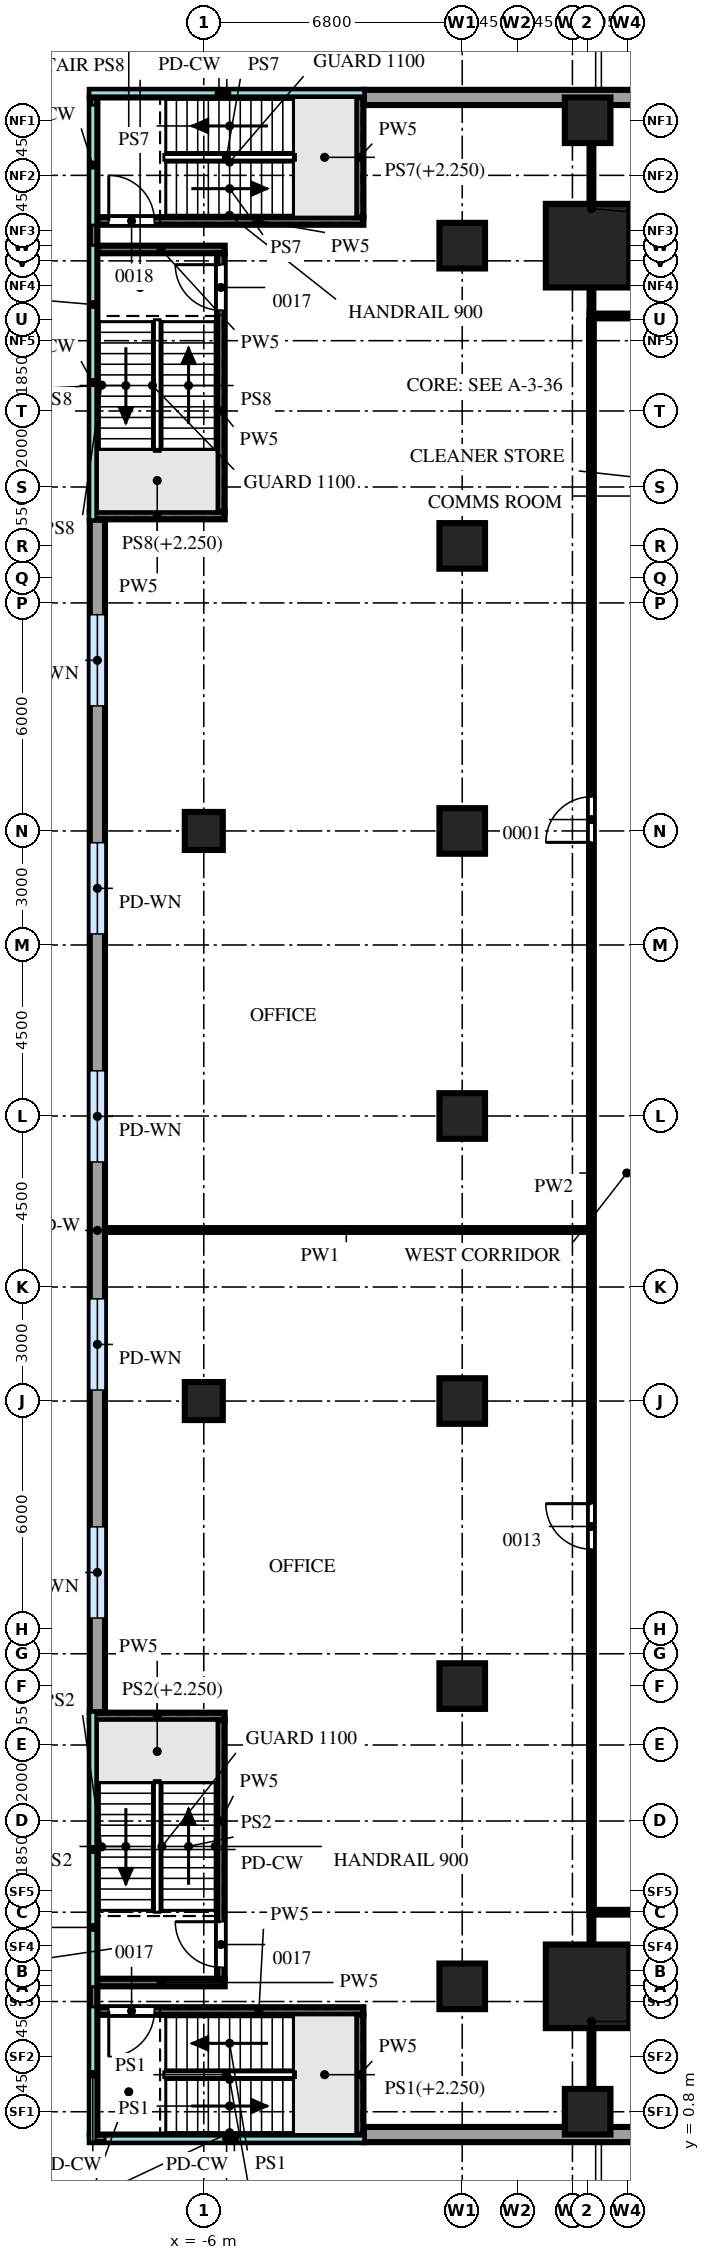
"""IFC4 building model, lengths in metres.
Left out: names, types, materials, properties, quantities, classifications, styles, units other than length and angle.
Written with IfcOpenShell. Run it as: python <this file> out.ifc"""

import sys

from ifc_helpers import new_model, si_unit, direction, frame, frame_2d, origin, origin_2d, place, context, subcontext, project, spatial, rectangle, extrude, source, transform, mapped, element, fill, save


model = new_model("IFC4")
c1 = context("Model", 3, precision=1e-05, world=origin(), true_north=direction((0.0, 1.0)))
c2 = subcontext(c1, "Body", "Model", "MODEL_VIEW")
j1 = project(units=[si_unit("LENGTHUNIT", "METRE"), si_unit("PLANEANGLEUNIT", "RADIAN")], contexts=[c1])
p1 = place(None, origin())
s1 = spatial("IfcSite", under=j1, at=p1, CompositionType="ELEMENT")
p2 = place(p1, origin())
s2 = spatial("IfcBuilding", under=s1, at=p2, CompositionType="ELEMENT")
p3 = place(p2, frame((0.0, 0.0, 28.5)))
s3 = spatial("IfcBuildingStorey", under=s2, at=p3, CompositionType="ELEMENT", Elevation=28.5)
m1 = source(origin(), c2, "Body", "SweptSolid", [
    extrude(rectangle(XDim=2.2, YDim=2.2, at=origin_2d()), origin(), (0.0, 0.0, 1.0), 4.5),
])
for number, where, z_axis, x_axis in (
    (1, (4.1, 49.9, 0.0), (0.0, 0.0, 1.0), (1.0, 0.0, 0.0)),
    (2, (4.1, 4.1, 0.0), (0.0, 0.0, 1.0), (1.0, 0.0, 0.0)),
):
    element("IfcColumn", number, at=place(p3, frame(where, z_axis=z_axis, x_axis=x_axis)), inside=s3, PredefinedType="COLUMN", context=c2, shape_type="MappedRepresentation", body=[
        mapped(m1, transform((0.0, 0.0, 0.0))),
    ])
m2 = source(origin(), c2, "Body", "SweptSolid", [
    extrude(rectangle(XDim=1.2, YDim=1.2, at=origin_2d()), origin(), (0.0, 0.0, 1.0), 4.0),
])
for number, where, z_axis, x_axis in (
    (3, (4.1, 0.8, 0.0), (0.0, 0.0, 1.0), (1.0, 0.0, 0.0)),
    (4, (4.1, 53.2, 0.0), (0.0, 0.0, 1.0), (1.0, 0.0, 0.0)),
    (5, (0.8, 4.1, 0.0), (0.0, 0.0, 1.0), (1.0, 0.0, 0.0)),
    (6, (0.8, 12.0, 0.0), (0.0, 0.0, 1.0), (1.0, 0.0, 0.0)),
    (7, (0.8, 19.5, 0.0), (0.0, 0.0, 1.0), (1.0, 0.0, 0.0)),
    (8, (0.8, 27.0, 0.0), (0.0, 0.0, 1.0), (1.0, 0.0, 0.0)),
    (9, (0.8, 34.5, 0.0), (0.0, 0.0, 1.0), (1.0, 0.0, 0.0)),
    (10, (0.8, 42.0, 0.0), (0.0, 0.0, 1.0), (1.0, 0.0, 0.0)),
    (11, (0.8, 49.9, 0.0), (0.0, 0.0, 1.0), (1.0, 0.0, 0.0)),
):
    element("IfcColumn", number, at=place(p3, frame(where, z_axis=z_axis, x_axis=x_axis)), inside=s3, PredefinedType="COLUMN", context=c2, shape_type="MappedRepresentation", body=[
        mapped(m2, transform((0.0, 0.0, 0.0))),
    ])
m3 = source(origin(), c2, "Body", "SweptSolid", [
    extrude(rectangle(XDim=1.0, YDim=1.0, at=origin_2d()), origin(), (0.0, 0.0, 1.0), 4.5),
])
for number, where, z_axis, x_axis in (
    (12, (-6.0, 19.5, 0.0), (0.0, 0.0, 1.0), (1.0, 0.0, 0.0)),
    (13, (-6.0, 34.5, 0.0), (0.0, 0.0, 1.0), (1.0, 0.0, 0.0)),
):
    element("IfcColumn", number, at=place(p3, frame(where, z_axis=z_axis, x_axis=x_axis)), inside=s3, PredefinedType="COLUMN", context=c2, shape_type="MappedRepresentation", body=[
        mapped(m3, transform((0.0, 0.0, 0.0))),
    ])
m4 = source(origin(), c2, "Body", "SweptSolid", [
    extrude(rectangle(XDim=31.38, YDim=0.4, at=frame_2d((15.69, 0.0))), origin(), (0.0, 0.0, 1.0), 4.2),
])
p4 = place(p3, frame((-8.8, 42.69, 0.0), z_axis=(0.0, 0.0, 1.0), x_axis=(0.0, -1.0, 0.0)))
e14 = element("IfcWall", 14, at=p4, inside=s3, PredefinedType="SOLIDWALL", context=c2, shape_type="MappedRepresentation", body=[
    mapped(m4, transform((0.0, 0.0, 0.0))),
])
m5 = source(origin(), c2, "Body", "SweptSolid", [
    extrude(rectangle(XDim=2.4, YDim=2.4, at=frame_2d((1.2, 1.2))), frame((0.0, 0.21, 0.0), z_axis=(0.0, -1.0, 0.0), x_axis=(1.0, 0.0, 0.0)), (0.0, 0.0, 1.0), 0.42),
])
p5 = place(p4, frame((2.5, 0.0, 1.0)))
e15 = element("IfcOpeningElement", 15, at=p5, cuts=e14, PredefinedType="OPENING", context=c2, shape_type="MappedRepresentation", body=[
    mapped(m5, transform((0.0, 0.0, 0.0))),
])
p6 = place(p4, frame((8.5, 0.0, 1.0)))
e16 = element("IfcOpeningElement", 16, at=p6, cuts=e14, PredefinedType="OPENING", context=c2, shape_type="MappedRepresentation", body=[
    mapped(m5, transform((0.0, 0.0, 0.0))),
])
p7 = place(p4, frame((14.5, 0.0, 1.0)))
e17 = element("IfcOpeningElement", 17, at=p7, cuts=e14, PredefinedType="OPENING", context=c2, shape_type="MappedRepresentation", body=[
    mapped(m5, transform((0.0, 0.0, 0.0))),
])
p8 = place(p4, frame((20.5, 0.0, 1.0)))
e18 = element("IfcOpeningElement", 18, at=p8, cuts=e14, PredefinedType="OPENING", context=c2, shape_type="MappedRepresentation", body=[
    mapped(m5, transform((0.0, 0.0, 0.0))),
])
p9 = place(p4, frame((26.5, 0.0, 1.0)))
e19 = element("IfcOpeningElement", 19, at=p9, cuts=e14, PredefinedType="OPENING", context=c2, shape_type="MappedRepresentation", body=[
    mapped(m5, transform((0.0, 0.0, 0.0))),
])
m6 = source(origin(), c2, "Body", "SweptSolid", [
    extrude(rectangle(XDim=33.64, YDim=0.4, at=frame_2d((16.82, 0.0))), origin(), (0.0, 0.0, 1.0), 4.2),
])
p10 = place(p3, frame((-1.79, 0.2, 0.0), z_axis=(0.0, 0.0, 1.0), x_axis=(1.0, 0.0, 0.0)))
e20 = element("IfcWall", 20, at=p10, inside=s3, PredefinedType="SOLIDWALL", context=c2, shape_type="MappedRepresentation", body=[
    mapped(m6, transform((0.0, 0.0, 0.0))),
])
p11 = place(p10, frame((9.6, 0.0, 1.0)))
e21 = element("IfcOpeningElement", 21, at=p11, cuts=e20, PredefinedType="OPENING", context=c2, shape_type="MappedRepresentation", body=[
    mapped(m5, transform((0.0, 0.0, 0.0))),
])
p12 = place(p10, frame((15.6, 0.0, 1.0)))
e22 = element("IfcOpeningElement", 22, at=p12, cuts=e20, PredefinedType="OPENING", context=c2, shape_type="MappedRepresentation", body=[
    mapped(m5, transform((0.0, 0.0, 0.0))),
])
m7 = source(origin(), c2, "Body", "SweptSolid", [
    extrude(rectangle(XDim=33.24, YDim=0.4, at=frame_2d((16.62, 0.0))), origin(), (0.0, 0.0, 1.0), 4.2),
])
p13 = place(p3, frame((31.45, 53.8, 0.0), z_axis=(0.0, 0.0, 1.0), x_axis=(-1.0, 0.0, 0.0)))
e23 = element("IfcWall", 23, at=p13, inside=s3, PredefinedType="SOLIDWALL", context=c2, shape_type="MappedRepresentation", body=[
    mapped(m7, transform((0.0, 0.0, 0.0))),
])
p14 = place(p13, frame((15.4, 0.0, 1.0)))
e24 = element("IfcOpeningElement", 24, at=p14, cuts=e23, PredefinedType="OPENING", context=c2, shape_type="MappedRepresentation", body=[
    mapped(m5, transform((0.0, 0.0, 0.0))),
])
p15 = place(p13, frame((21.4, 0.0, 1.0)))
e25 = element("IfcOpeningElement", 25, at=p15, cuts=e23, PredefinedType="OPENING", context=c2, shape_type="MappedRepresentation", body=[
    mapped(m5, transform((0.0, 0.0, 0.0))),
])
m8 = source(origin(), c2, "Body", "SweptSolid", [
    extrude(rectangle(XDim=7.2, YDim=0.2, at=frame_2d((3.6, 0.0))), origin(), (0.0, 0.0, 1.0), 4.0),
])
p16 = place(p3, frame((-9.0, 0.1, 0.0), z_axis=(0.0, 0.0, 1.0), x_axis=(1.0, 0.0, 0.0)))
e26 = element("IfcWall", 26, at=p16, inside=s3, PredefinedType="PARTITIONING", context=c2, shape_type="MappedRepresentation", body=[
    mapped(m8, transform((0.0, 0.0, 0.0))),
])
m9 = source(origin(), c2, "Body", "SweptSolid", [
    extrude(rectangle(XDim=7.0, YDim=0.2, at=frame_2d((3.5, 0.0))), origin(), (0.0, 0.0, 1.0), 4.0),
])
p17 = place(p3, frame((-8.8, 3.45, 0.0), z_axis=(0.0, 0.0, 1.0), x_axis=(1.0, 0.0, 0.0)))
e27 = element("IfcWall", 27, at=p17, inside=s3, PredefinedType="PARTITIONING", context=c2, shape_type="MappedRepresentation", body=[
    mapped(m9, transform((0.0, 0.0, 0.0))),
])
m10 = source(origin(), c2, "Body", "SweptSolid", [
    extrude(rectangle(XDim=1.2, YDim=2.1, at=frame_2d((0.6, 1.05))), frame((0.0, 0.11, 0.0), z_axis=(0.0, -1.0, 0.0), x_axis=(1.0, 0.0, 0.0)), (0.0, 0.0, 1.0), 0.22),
])
p18 = place(p17, frame((0.3, 0.0, 0.0)))
e28 = element("IfcOpeningElement", 28, at=p18, cuts=e27, PredefinedType="OPENING", context=c2, shape_type="MappedRepresentation", body=[
    mapped(m10, transform((0.0, 0.0, 0.0))),
])
m11 = source(origin(), c2, "Body", "SweptSolid", [
    extrude(rectangle(XDim=10.9, YDim=0.2, at=frame_2d((5.45, 0.0))), origin(), (0.0, 0.0, 1.0), 4.0),
])
p19 = place(p3, frame((-8.9, 0.2, 0.0), z_axis=(0.0, 0.0, 1.0), x_axis=(0.0, 1.0, 0.0)))
e29 = element("IfcWall", 29, at=p19, inside=s3, PredefinedType="PARTITIONING", context=c2, shape_type="MappedRepresentation", body=[
    mapped(m11, transform((0.0, 0.0, 0.0))),
])
m12 = source(origin(), c2, "Body", "SweptSolid", [
    extrude(rectangle(XDim=3.15, YDim=0.2, at=frame_2d((1.575, 0.0))), origin(), (0.0, 0.0, 1.0), 4.0),
])
p20 = place(p3, frame((-1.9, 0.2, 0.0), z_axis=(0.0, 0.0, 1.0), x_axis=(0.0, 1.0, 0.0)))
e30 = element("IfcWall", 30, at=p20, inside=s3, PredefinedType="PARTITIONING", context=c2, shape_type="MappedRepresentation", body=[
    mapped(m12, transform((0.0, 0.0, 0.0))),
])
m13 = source(origin(), c2, "Body", "SweptSolid", [
    extrude(rectangle(XDim=3.35, YDim=0.2, at=frame_2d((1.675, 0.0))), origin(), (0.0, 0.0, 1.0), 4.0),
])
p21 = place(p3, frame((-8.8, 4.2, 0.0), z_axis=(0.0, 0.0, 1.0), x_axis=(1.0, 0.0, 0.0)))
e31 = element("IfcWall", 31, at=p21, inside=s3, PredefinedType="PARTITIONING", context=c2, shape_type="MappedRepresentation", body=[
    mapped(m13, transform((0.0, 0.0, 0.0))),
])
m14 = source(origin(), c2, "Body", "SweptSolid", [
    extrude(rectangle(XDim=3.55, YDim=0.2, at=frame_2d((1.775, 0.0))), origin(), (0.0, 0.0, 1.0), 4.0),
])
p22 = place(p3, frame((-9.0, 11.2, 0.0), z_axis=(0.0, 0.0, 1.0), x_axis=(1.0, 0.0, 0.0)))
e32 = element("IfcWall", 32, at=p22, inside=s3, PredefinedType="PARTITIONING", context=c2, shape_type="MappedRepresentation", body=[
    mapped(m14, transform((0.0, 0.0, 0.0))),
])
m15 = source(origin(), c2, "Body", "SweptSolid", [
    extrude(rectangle(XDim=6.8, YDim=0.2, at=frame_2d((3.4, 0.0))), origin(), (0.0, 0.0, 1.0), 4.0),
])
p23 = place(p3, frame((-5.55, 4.3, 0.0), z_axis=(0.0, 0.0, 1.0), x_axis=(0.0, 1.0, 0.0)))
e33 = element("IfcWall", 33, at=p23, inside=s3, PredefinedType="PARTITIONING", context=c2, shape_type="MappedRepresentation", body=[
    mapped(m15, transform((0.0, 0.0, 0.0))),
])
p24 = place(p23, frame((0.3, 0.0, 0.0)))
e34 = element("IfcOpeningElement", 34, at=p24, cuts=e33, PredefinedType="OPENING", context=c2, shape_type="MappedRepresentation", body=[
    mapped(m10, transform((0.0, 0.0, 0.0))),
])
p25 = place(p3, frame((-8.8, 50.55, 0.0), z_axis=(0.0, 0.0, 1.0), x_axis=(1.0, 0.0, 0.0)))
e35 = element("IfcWall", 35, at=p25, inside=s3, PredefinedType="PARTITIONING", context=c2, shape_type="MappedRepresentation", body=[
    mapped(m9, transform((0.0, 0.0, 0.0))),
])
p26 = place(p25, frame((0.3, 0.0, 0.0)))
e36 = element("IfcOpeningElement", 36, at=p26, cuts=e35, PredefinedType="OPENING", context=c2, shape_type="MappedRepresentation", body=[
    mapped(m10, transform((0.0, 0.0, 0.0))),
])
p27 = place(p3, frame((-9.0, 53.9, 0.0), z_axis=(0.0, 0.0, 1.0), x_axis=(1.0, 0.0, 0.0)))
e37 = element("IfcWall", 37, at=p27, inside=s3, PredefinedType="PARTITIONING", context=c2, shape_type="MappedRepresentation", body=[
    mapped(m8, transform((0.0, 0.0, 0.0))),
])
p28 = place(p3, frame((-1.9, 50.65, 0.0), z_axis=(0.0, 0.0, 1.0), x_axis=(0.0, 1.0, 0.0)))
e38 = element("IfcWall", 38, at=p28, inside=s3, PredefinedType="PARTITIONING", context=c2, shape_type="MappedRepresentation", body=[
    mapped(m12, transform((0.0, 0.0, 0.0))),
])
p29 = place(p3, frame((-9.0, 42.8, 0.0), z_axis=(0.0, 0.0, 1.0), x_axis=(1.0, 0.0, 0.0)))
e39 = element("IfcWall", 39, at=p29, inside=s3, PredefinedType="PARTITIONING", context=c2, shape_type="MappedRepresentation", body=[
    mapped(m14, transform((0.0, 0.0, 0.0))),
])
p30 = place(p3, frame((-8.8, 49.8, 0.0), z_axis=(0.0, 0.0, 1.0), x_axis=(1.0, 0.0, 0.0)))
e40 = element("IfcWall", 40, at=p30, inside=s3, PredefinedType="PARTITIONING", context=c2, shape_type="MappedRepresentation", body=[
    mapped(m13, transform((0.0, 0.0, 0.0))),
])
p31 = place(p3, frame((-8.9, 42.9, 0.0), z_axis=(0.0, 0.0, 1.0), x_axis=(0.0, 1.0, 0.0)))
e41 = element("IfcWall", 41, at=p31, inside=s3, PredefinedType="PARTITIONING", context=c2, shape_type="MappedRepresentation", body=[
    mapped(m11, transform((0.0, 0.0, 0.0))),
])
p32 = place(p3, frame((-5.55, 42.9, 0.0), z_axis=(0.0, 0.0, 1.0), x_axis=(0.0, 1.0, 0.0)))
e42 = element("IfcWall", 42, at=p32, inside=s3, PredefinedType="PARTITIONING", context=c2, shape_type="MappedRepresentation", body=[
    mapped(m15, transform((0.0, 0.0, 0.0))),
])
p33 = place(p32, frame((5.3, 0.0, 0.0)))
e43 = element("IfcOpeningElement", 43, at=p33, cuts=e42, PredefinedType="OPENING", context=c2, shape_type="MappedRepresentation", body=[
    mapped(m10, transform((0.0, 0.0, 0.0))),
])
m16 = source(origin(), c2, "Body", "SweptSolid", [
    extrude(rectangle(XDim=5.55, YDim=0.1, at=frame_2d((2.775, 0.0))), origin(), (0.0, 0.0, 1.0), 3.4),
])
p34 = place(p3, frame((4.2, 0.4, 0.0), z_axis=(0.0, 0.0, 1.0), x_axis=(0.0, 1.0, 0.0)))
e44 = element("IfcWall", 44, at=p34, inside=s3, PredefinedType="PARTITIONING", context=c2, shape_type="MappedRepresentation", body=[
    mapped(m16, transform((0.0, 0.0, 0.0))),
])
m17 = source(origin(), c2, "Body", "SweptSolid", [
    extrude(rectangle(XDim=22.15, YDim=0.125, at=frame_2d((11.075, 0.0))), origin(), (0.0, 0.0, 1.0), 4.0),
])
p35 = place(p3, frame((4.15, 6.05, 0.0), z_axis=(0.0, 0.0, 1.0), x_axis=(1.0, 0.0, 0.0)))
e45 = element("IfcWall", 45, at=p35, inside=s3, PredefinedType="PARTITIONING", context=c2, shape_type="MappedRepresentation", body=[
    mapped(m17, transform((0.0, 0.0, 0.0))),
])
m18 = source(origin(), c2, "Body", "SweptSolid", [
    extrude(rectangle(XDim=1.2, YDim=2.1, at=frame_2d((0.6, 1.05))), frame((0.0, 0.073, 0.0), z_axis=(0.0, -1.0, 0.0), x_axis=(1.0, 0.0, 0.0)), (0.0, 0.0, 1.0), 0.145),
])
p36 = place(p35, frame((9.2, 0.0, 0.0)))
e46 = element("IfcOpeningElement", 46, at=p36, cuts=e45, PredefinedType="OPENING", context=c2, shape_type="MappedRepresentation", body=[
    mapped(m18, transform((0.0, 0.0, 0.0))),
])
m19 = source(origin(), c2, "Body", "SweptSolid", [
    extrude(rectangle(XDim=41.8, YDim=0.125, at=frame_2d((20.9, 0.0))), origin(), (0.0, 0.0, 1.0), 4.0),
])
p37 = place(p3, frame((4.2, 6.15, 0.0), z_axis=(0.0, 0.0, 1.0), x_axis=(0.0, 1.0, 0.0)))
e47 = element("IfcWall", 47, at=p37, inside=s3, PredefinedType="PARTITIONING", context=c2, shape_type="MappedRepresentation", body=[
    mapped(m19, transform((0.0, 0.0, 0.0))),
])
p38 = place(p37, frame((9.45, 0.0, 0.0)))
e48 = element("IfcOpeningElement", 48, at=p38, cuts=e47, PredefinedType="OPENING", context=c2, shape_type="MappedRepresentation", body=[
    mapped(m18, transform((0.0, 0.0, 0.0))),
])
p39 = place(p37, frame((28.05, 0.0, 0.0)))
e49 = element("IfcOpeningElement", 49, at=p39, cuts=e47, PredefinedType="OPENING", context=c2, shape_type="MappedRepresentation", body=[
    mapped(m18, transform((0.0, 0.0, 0.0))),
])
m20 = source(origin(), c2, "Body", "SweptSolid", [
    extrude(rectangle(XDim=12.7, YDim=0.1, at=frame_2d((6.35, 0.0))), origin(), (0.0, 0.0, 1.0), 4.0),
])
p40 = place(p3, frame((-8.6, 24.0, 0.0), z_axis=(0.0, 0.0, 1.0), x_axis=(1.0, 0.0, 0.0)))
e50 = element("IfcWall", 50, at=p40, inside=s3, PredefinedType="PARTITIONING", context=c2, shape_type="MappedRepresentation", body=[
    mapped(m20, transform((0.0, 0.0, 0.0))),
])
m21 = source(origin(), c2, "Body", "SweptSolid", [
    extrude(rectangle(XDim=27.3, YDim=0.125, at=frame_2d((13.65, 0.0))), origin(), (0.0, 0.0, 1.0), 4.0),
])
p41 = place(p3, frame((4.15, 48.05, 0.0), z_axis=(0.0, 0.0, 1.0), x_axis=(1.0, 0.0, 0.0)))
e51 = element("IfcWall", 51, at=p41, inside=s3, PredefinedType="PARTITIONING", context=c2, shape_type="MappedRepresentation", body=[
    mapped(m21, transform((0.0, 0.0, 0.0))),
])
m22 = source(origin(), c2, "Body", "SweptSolid", [
    extrude(rectangle(XDim=0.9, YDim=2.1, at=frame_2d((0.45, 1.05))), frame((0.0, 0.073, 0.0), z_axis=(0.0, -1.0, 0.0), x_axis=(1.0, 0.0, 0.0)), (0.0, 0.0, 1.0), 0.145),
])
p42 = place(p41, frame((2.5, 0.0, 0.0)))
e52 = element("IfcOpeningElement", 52, at=p42, cuts=e51, PredefinedType="OPENING", context=c2, shape_type="MappedRepresentation", body=[
    mapped(m22, transform((0.0, 0.0, 0.0))),
])
p43 = place(p41, frame((8.75, 0.0, 0.0)))
e53 = element("IfcOpeningElement", 53, at=p43, cuts=e51, PredefinedType="OPENING", context=c2, shape_type="MappedRepresentation", body=[
    mapped(m22, transform((0.0, 0.0, 0.0))),
])
p44 = place(p41, frame((19.85, 0.0, 0.0)))
e54 = element("IfcOpeningElement", 54, at=p44, cuts=e51, PredefinedType="OPENING", context=c2, shape_type="MappedRepresentation", body=[
    mapped(m22, transform((0.0, 0.0, 0.0))),
])
m23 = source(origin(), c2, "Body", "SweptSolid", [
    extrude(rectangle(XDim=5.45, YDim=0.1, at=frame_2d((2.725, 0.0))), origin(), (0.0, 0.0, 1.0), 3.4),
])
p45 = place(p3, frame((4.2, 48.15, 0.0), z_axis=(0.0, 0.0, 1.0), x_axis=(0.0, 1.0, 0.0)))
e55 = element("IfcWall", 55, at=p45, inside=s3, PredefinedType="PARTITIONING", context=c2, shape_type="MappedRepresentation", body=[
    mapped(m23, transform((0.0, 0.0, 0.0))),
])
m24 = source(origin(), c2, "Body", "SweptSolid", [
    extrude(rectangle(XDim=2.4, YDim=2.4, at=frame_2d((1.2, 1.2))), frame((0.0, 0.03, 0.0), z_axis=(0.0, -1.0, 0.0), x_axis=(1.0, 0.0, 0.0)), (0.0, 0.0, 1.0), 0.06),
])
p46 = place(p5, origin())
e56 = element("IfcWindow", 56, at=p46, inside=s3, PartitioningType="SINGLE_PANEL", PredefinedType="WINDOW", context=c2, shape_type="MappedRepresentation", body=[
    mapped(m24, transform((0.0, 0.0, 0.0))),
])
fill(e15, e56)
p47 = place(p6, origin())
e57 = element("IfcWindow", 57, at=p47, inside=s3, PartitioningType="SINGLE_PANEL", PredefinedType="WINDOW", context=c2, shape_type="MappedRepresentation", body=[
    mapped(m24, transform((0.0, 0.0, 0.0))),
])
fill(e16, e57)
p48 = place(p7, origin())
e58 = element("IfcWindow", 58, at=p48, inside=s3, PartitioningType="SINGLE_PANEL", PredefinedType="WINDOW", context=c2, shape_type="MappedRepresentation", body=[
    mapped(m24, transform((0.0, 0.0, 0.0))),
])
fill(e17, e58)
p49 = place(p8, origin())
e59 = element("IfcWindow", 59, at=p49, inside=s3, PartitioningType="SINGLE_PANEL", PredefinedType="WINDOW", context=c2, shape_type="MappedRepresentation", body=[
    mapped(m24, transform((0.0, 0.0, 0.0))),
])
fill(e18, e59)
p50 = place(p9, origin())
e60 = element("IfcWindow", 60, at=p50, inside=s3, PartitioningType="SINGLE_PANEL", PredefinedType="WINDOW", context=c2, shape_type="MappedRepresentation", body=[
    mapped(m24, transform((0.0, 0.0, 0.0))),
])
fill(e19, e60)
m25 = source(origin(), c2, "Body", "SweptSolid", [
    extrude(rectangle(XDim=1.2, YDim=2.1, at=frame_2d((0.6, 1.05))), frame((0.0, 0.025, 0.0), z_axis=(0.0, -1.0, 0.0), x_axis=(1.0, 0.0, 0.0)), (0.0, 0.0, 1.0), 0.05),
])
p51 = place(p38, origin())
e61 = element("IfcDoor", 61, at=p51, inside=s3, OperationType="SINGLE_SWING_LEFT", PredefinedType="DOOR", context=c2, shape_type="MappedRepresentation", body=[
    mapped(m25, transform((0.0, 0.0, 0.0))),
])
fill(e48, e61)
p52 = place(p39, origin())
e62 = element("IfcDoor", 62, at=p52, inside=s3, OperationType="SINGLE_SWING_RIGHT", PredefinedType="DOOR", context=c2, shape_type="MappedRepresentation", body=[
    mapped(m25, transform((0.0, 0.0, 0.0))),
])
fill(e49, e62)
p53 = place(p18, origin())
e63 = element("IfcDoor", 63, at=p53, inside=s3, OperationType="SINGLE_SWING_LEFT", PredefinedType="DOOR", context=c2, shape_type="MappedRepresentation", body=[
    mapped(m25, transform((0.0, 0.0, 0.0))),
])
fill(e28, e63)
p54 = place(p24, origin())
e64 = element("IfcDoor", 64, at=p54, inside=s3, OperationType="SINGLE_SWING_LEFT", PredefinedType="DOOR", context=c2, shape_type="MappedRepresentation", body=[
    mapped(m25, transform((0.0, 0.0, 0.0))),
])
fill(e34, e64)
p55 = place(p26, origin())
e65 = element("IfcDoor", 65, at=p55, inside=s3, OperationType="SINGLE_SWING_RIGHT", PredefinedType="DOOR", context=c2, shape_type="MappedRepresentation", body=[
    mapped(m25, transform((0.0, 0.0, 0.0))),
])
fill(e36, e65)
p56 = place(p33, origin())
e66 = element("IfcDoor", 66, at=p56, inside=s3, OperationType="SINGLE_SWING_LEFT", PredefinedType="DOOR", context=c2, shape_type="MappedRepresentation", body=[
    mapped(m25, transform((0.0, 0.0, 0.0))),
])
fill(e43, e66)
save(model, sys.argv[1])
